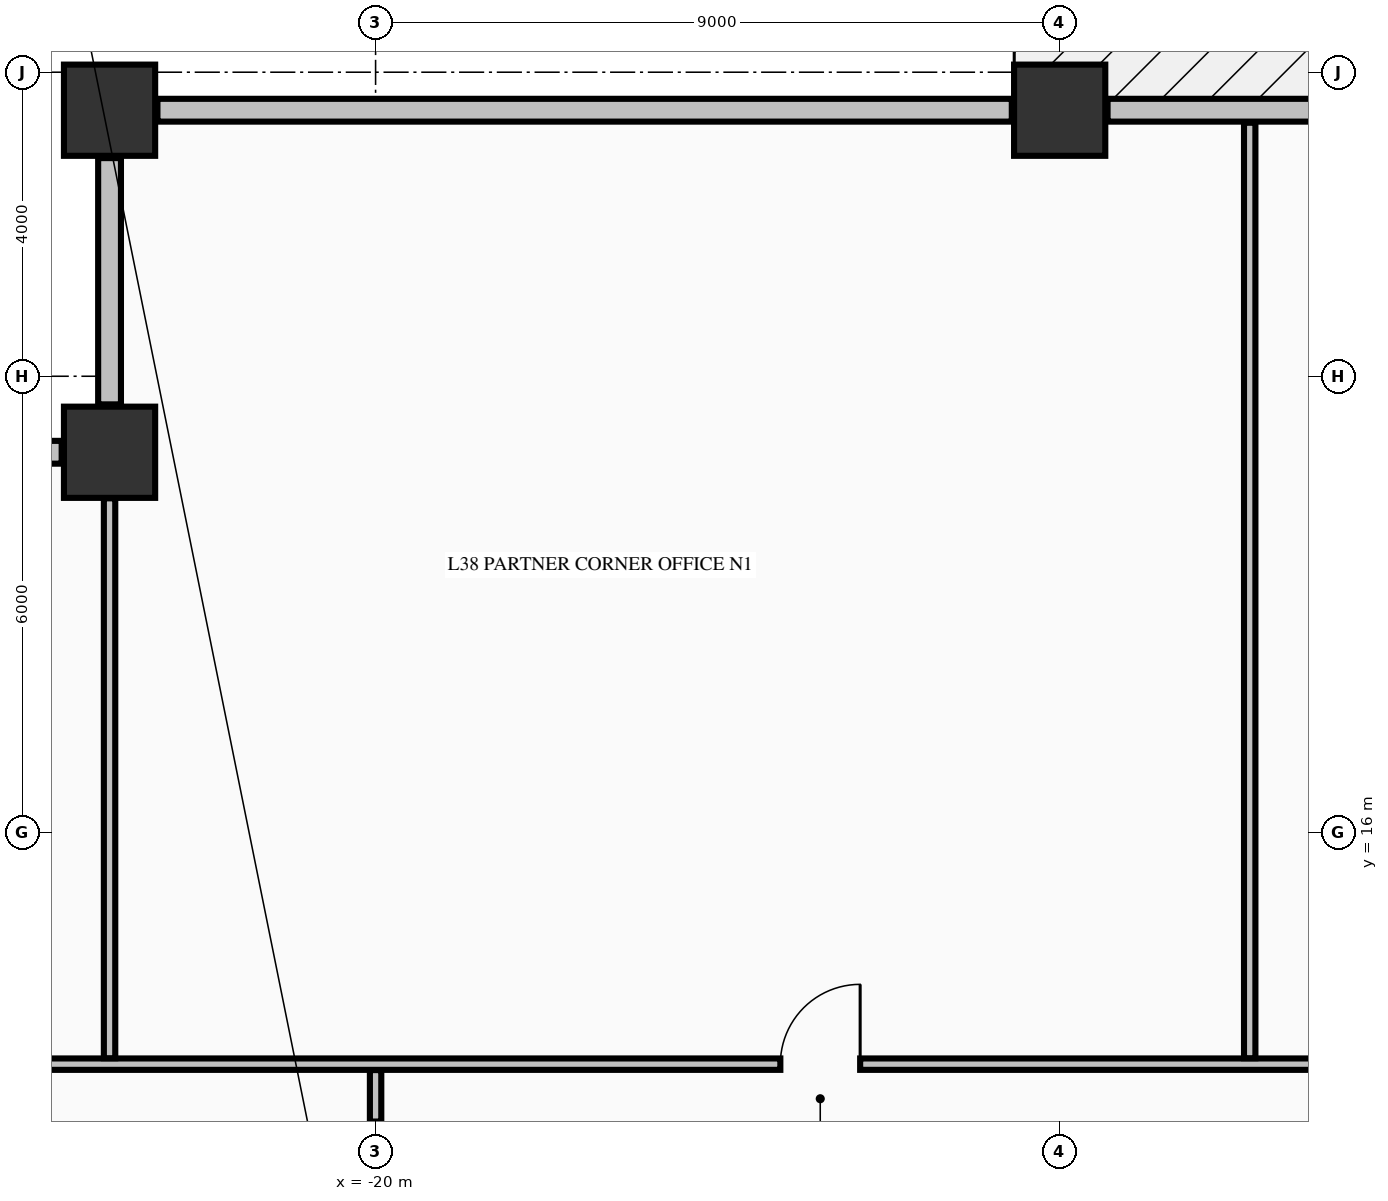
"""IFC4 building model, lengths in metres.
Left out: names, types, materials, properties, quantities, classifications, styles, units other than length and angle.
Written with IfcOpenShell. Run it as: python <this file> out.ifc"""

import sys

from ifc_helpers import new_model, si_unit, direction, frame, frame_2d, origin, origin_2d, place, context, subcontext, project, spatial, rectangle, extrude, element, fill, save


model = new_model("IFC4")
c1 = context("Model", 3, precision=1e-05, world=origin(), true_north=direction((0.0, 1.0)))
c2 = subcontext(c1, "Body", "Model", "MODEL_VIEW")
j1 = project(units=[si_unit("LENGTHUNIT", "METRE"), si_unit("PLANEANGLEUNIT", "RADIAN")], contexts=[c1])
p1 = place(None, origin())
s1 = spatial("IfcSite", under=j1, at=p1, CompositionType="ELEMENT")
p2 = place(p1, origin())
s2 = spatial("IfcBuilding", under=s1, at=p2, CompositionType="ELEMENT")
p3 = place(p2, frame((0.0, 0.0, 149.91)))
s3 = spatial("IfcBuildingStorey", under=s2, at=p3, CompositionType="ELEMENT", Elevation=149.91)
for number, where, z_axis, x_axis in (
    (1, (-23.5, 25.5, -0.25), (0.0, 0.0, 1.0), (1.0, 0.0, 0.0)),
    (2, (-11.0, 25.5, -0.25), (0.0, 0.0, 1.0), (1.0, 0.0, 0.0)),
    (3, (-23.5, 21.0, -0.25), (0.0, 0.0, 1.0), (1.0, 0.0, 0.0)),
):
    element("IfcColumn", number, at=place(p3, frame(where, z_axis=z_axis, x_axis=x_axis)), inside=s3, PredefinedType="COLUMN", context=c2, shape_type="SweptSolid", body=[
        extrude(rectangle(XDim=1.2, YDim=1.2, at=origin_2d()), origin(), (0.0, 0.0, 1.0), 3.395),
    ])
for number, where, z_axis, x_axis in (
    (4, (-23.5, 24.87, 0.0), (0.0, 0.0, 1.0), (0.0, -1.0, 0.0)),
    (5, (-24.13, 21.0, 0.0), (0.0, 0.0, 1.0), (-1.0, 0.0, 0.0)),
):
    element("IfcWall", number, at=place(p3, frame(where, z_axis=z_axis, x_axis=x_axis)), inside=s3, PredefinedType="STANDARD", context=c2, shape_type="SweptSolid", body=[
        extrude(rectangle(XDim=3.24, YDim=0.3, at=frame_2d((1.62, 0.0))), origin(), (0.0, 0.0, 1.0), 2.537),
    ])
p4 = place(p3, frame((-11.63, 25.5, 0.0), z_axis=(0.0, 0.0, 1.0), x_axis=(-1.0, 0.0, 0.0)))
e6 = element("IfcWall", 6, at=p4, inside=s3, PredefinedType="STANDARD", context=c2, shape_type="SweptSolid", body=[
    extrude(rectangle(XDim=11.24, YDim=0.3, at=frame_2d((5.62, 0.0))), origin(), (0.0, 0.0, 1.0), 2.537),
])
p5 = place(p3, frame((-0.63, 25.5, 0.0), z_axis=(0.0, 0.0, 1.0), x_axis=(-1.0, 0.0, 0.0)))
e7 = element("IfcWall", 7, at=p5, inside=s3, PredefinedType="STANDARD", context=c2, shape_type="SweptSolid", body=[
    extrude(rectangle(XDim=9.74, YDim=0.3, at=frame_2d((4.87, 0.0))), origin(), (0.0, 0.0, 1.0), 2.537),
])
p6 = place(p5, frame((2.947, 0.0, 0.0)))
e8 = element("IfcOpeningElement", 8, at=p6, cuts=e7, PredefinedType="OPENING", context=c2, shape_type="SweptSolid", body=[
    extrude(rectangle(XDim=1.1, YDim=2.15, at=frame_2d((0.55, 1.075))), frame((0.0, 0.16, 0.0), z_axis=(0.0, -1.0, 0.0), x_axis=(1.0, 0.0, 0.0)), (0.0, 0.0, 1.0), 0.32),
])
p7 = place(p3, frame((-27.835, 12.95, 0.0), z_axis=(0.0, 0.0, 1.0), x_axis=(1.0, 0.0, 0.0)))
e9 = element("IfcWall", 9, at=p7, inside=s3, PredefinedType="PARTITIONING", context=c2, shape_type="SweptSolid", body=[
    extrude(rectangle(XDim=50.67, YDim=0.15, at=frame_2d((25.335, 0.0))), origin(), (0.0, 0.0, 1.0), 3.145),
])
p8 = place(p7, frame((13.16, 0.0, 0.0)))
e10 = element("IfcOpeningElement", 10, at=p8, cuts=e9, PredefinedType="OPENING", context=c2, shape_type="SweptSolid", body=[
    extrude(rectangle(XDim=1.05, YDim=2.15, at=frame_2d((0.525, 1.075))), frame((0.0, 0.085, 0.0), z_axis=(0.0, -1.0, 0.0), x_axis=(1.0, 0.0, 0.0)), (0.0, 0.0, 1.0), 0.17),
])
p9 = place(p7, frame((23.06, 0.0, 0.0)))
e11 = element("IfcOpeningElement", 11, at=p9, cuts=e9, PredefinedType="OPENING", context=c2, shape_type="SweptSolid", body=[
    extrude(rectangle(XDim=1.05, YDim=2.15, at=frame_2d((0.525, 1.075))), frame((0.0, 0.085, 0.0), z_axis=(0.0, -1.0, 0.0), x_axis=(1.0, 0.0, 0.0)), (0.0, 0.0, 1.0), 0.17),
])
p10 = place(p7, frame((31.56, 0.0, 0.0)))
e12 = element("IfcOpeningElement", 12, at=p10, cuts=e9, PredefinedType="OPENING", context=c2, shape_type="SweptSolid", body=[
    extrude(rectangle(XDim=1.05, YDim=2.15, at=frame_2d((0.525, 1.075))), frame((0.0, 0.085, 0.0), z_axis=(0.0, -1.0, 0.0), x_axis=(1.0, 0.0, 0.0)), (0.0, 0.0, 1.0), 0.17),
])
p11 = place(p7, frame((40.81, 0.0, 0.0)))
e13 = element("IfcOpeningElement", 13, at=p11, cuts=e9, PredefinedType="OPENING", context=c2, shape_type="SweptSolid", body=[
    extrude(rectangle(XDim=1.05, YDim=2.15, at=frame_2d((0.525, 1.075))), frame((0.0, 0.085, 0.0), z_axis=(0.0, -1.0, 0.0), x_axis=(1.0, 0.0, 0.0)), (0.0, 0.0, 1.0), 0.17),
])
p12 = place(p3, frame((-23.5, 13.028, 0.0), z_axis=(0.0, 0.0, 1.0), x_axis=(0.0, 1.0, 0.0)))
e14 = element("IfcWall", 14, at=p12, inside=s3, PredefinedType="PARTITIONING", context=c2, shape_type="SweptSolid", body=[
    extrude(rectangle(XDim=7.366, YDim=0.15, at=frame_2d((3.683, 0.0))), origin(), (0.0, 0.0, 1.0), 3.145),
])
p13 = place(p3, frame((-20.0, 11.006, 0.0), z_axis=(0.0, 0.0, 1.0), x_axis=(0.0, 1.0, 0.0)))
e15 = element("IfcWall", 15, at=p13, inside=s3, PredefinedType="PARTITIONING", context=c2, shape_type="SweptSolid", body=[
    extrude(rectangle(XDim=1.866, YDim=0.15, at=frame_2d((0.933, 0.0))), origin(), (0.0, 0.0, 1.0), 2.635),
])
p14 = place(p13, frame((0.239, 0.0, 0.0)))
e16 = element("IfcOpeningElement", 16, at=p14, cuts=e15, PredefinedType="OPENING", context=c2, shape_type="SweptSolid", body=[
    extrude(rectangle(XDim=0.95, YDim=2.15, at=frame_2d((0.475, 1.075))), frame((0.0, 0.085, 0.0), z_axis=(0.0, -1.0, 0.0), x_axis=(1.0, 0.0, 0.0)), (0.0, 0.0, 1.0), 0.17),
])
p15 = place(p3, frame((-8.5, 13.028, 0.0), z_axis=(0.0, 0.0, 1.0), x_axis=(0.0, 1.0, 0.0)))
e17 = element("IfcWall", 17, at=p15, inside=s3, PredefinedType="PARTITIONING", context=c2, shape_type="SweptSolid", body=[
    extrude(rectangle(XDim=12.307, YDim=0.15, at=frame_2d((6.153, 0.0))), origin(), (0.0, 0.0, 1.0), 3.145),
])
p16 = place(p8, origin())
e18 = element("IfcDoor", 18, at=p16, inside=s3, OperationType="SINGLE_SWING_RIGHT", PredefinedType="DOOR", context=c2, shape_type="SweptSolid", body=[
    extrude(rectangle(XDim=1.05, YDim=2.15, at=frame_2d((0.525, 1.075))), frame((0.0, 0.025, 0.0), z_axis=(0.0, -1.0, 0.0), x_axis=(1.0, 0.0, 0.0)), (0.0, 0.0, 1.0), 0.05),
])
fill(e10, e18)
p17 = place(p14, origin())
e19 = element("IfcDoor", 19, at=p17, inside=s3, OperationType="SINGLE_SWING_LEFT", PredefinedType="DOOR", context=c2, shape_type="SweptSolid", body=[
    extrude(rectangle(XDim=0.95, YDim=2.15, at=frame_2d((0.475, 1.075))), frame((0.0, 0.025, 0.0), z_axis=(0.0, -1.0, 0.0), x_axis=(1.0, 0.0, 0.0)), (0.0, 0.0, 1.0), 0.05),
])
fill(e16, e19)
save(model, sys.argv[1])
